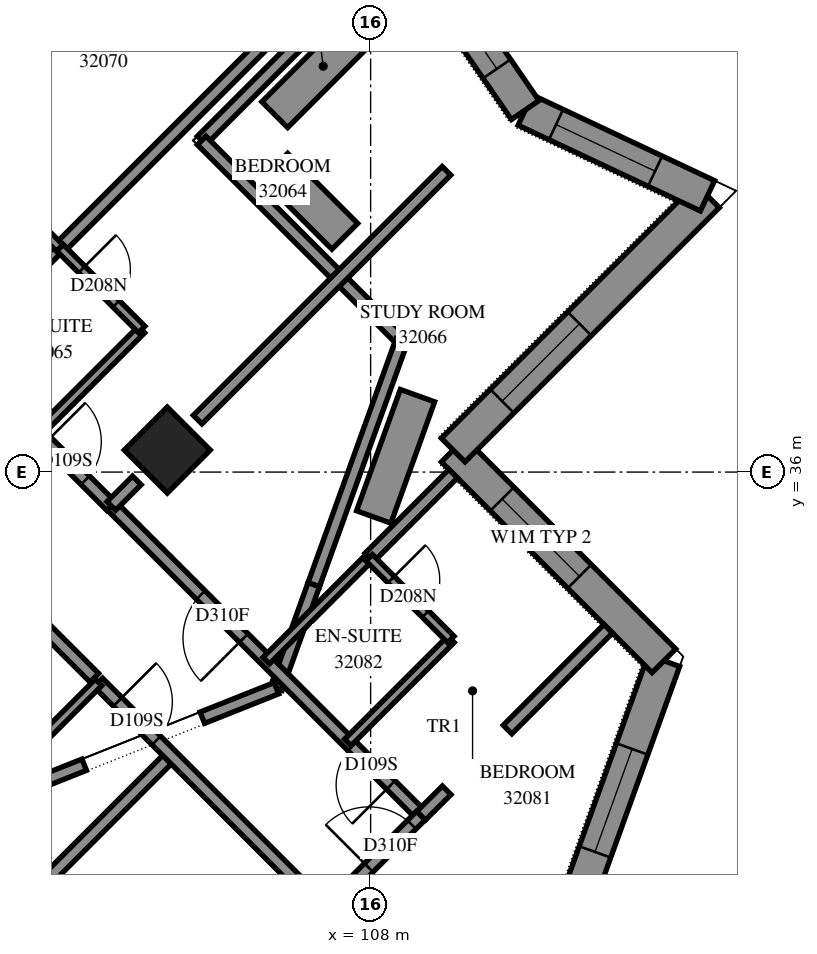
"""IFC4 building model, lengths in metres.
Left out: names, types, materials, properties, quantities, classifications, styles, units other than length and angle.
Written with IfcOpenShell. Run it as: python <this file> out.ifc"""

import sys

from ifc_helpers import new_model, si_unit, direction, frame, frame_2d, origin, origin_2d, place, context, subcontext, project, spatial, polyline, rectangle, outline, extrude, element, fill, save


model = new_model("IFC4")
c1 = context("Model", 3, precision=1e-05, world=origin(), true_north=direction((0.0, 1.0)))
c2 = subcontext(c1, "Body", "Model", "MODEL_VIEW")
j1 = project(units=[si_unit("LENGTHUNIT", "METRE"), si_unit("PLANEANGLEUNIT", "RADIAN")], contexts=[c1])
p1 = place(None, origin())
s1 = spatial("IfcSite", under=j1, at=p1, CompositionType="ELEMENT")
p2 = place(p1, origin())
s2 = spatial("IfcBuilding", under=s1, at=p2, CompositionType="ELEMENT")
p3 = place(p2, frame((0.0, 0.0, 118.6)))
s3 = spatial("IfcBuildingStorey", under=s2, at=p3, CompositionType="ELEMENT", Elevation=118.6)
p4 = place(p3, frame((104.656, 36.362, 0.0), z_axis=(0.0, 0.0, 1.0), x_axis=(0.7071067812, -0.7071067812, 0.0)))
e1 = element("IfcColumn", 1, at=p4, inside=s3, PredefinedType="COLUMN", context=c2, shape_type="SweptSolid", body=[
    extrude(rectangle(XDim=1.0, YDim=1.0, at=origin_2d()), origin(), (0.0, 0.0, 1.0), 3.1),
])
p5 = place(p3, frame((111.01, 27.869, 0.0), z_axis=(0.0, 0.0, 1.0), x_axis=(0.339264672, 0.9406909601, 0.0)))
e2 = element("IfcWall", 2, at=p5, inside=s3, PredefinedType="SOLIDWALL", context=c2, shape_type="SweptSolid", body=[
    extrude(outline(polyline([(-0.124, -0.275), (5.519, -0.275), (5.17, 0.275), (0.124, 0.275), (-0.124, -0.275)])), origin(), (0.0, 0.0, 1.0), 3.1),
])
p6 = place(p5, frame((2.003, 0.0, 0.7)))
e3 = element("IfcOpeningElement", 3, at=p6, cuts=e2, PredefinedType="OPENING", context=c2, shape_type="SweptSolid", body=[
    extrude(rectangle(XDim=1.8, YDim=2.0, at=frame_2d((0.9, 1.0))), frame((0.0, 0.285, 0.0), z_axis=(0.0, -1.0, 0.0), x_axis=(1.0, 0.0, 0.0)), (0.0, 0.0, 1.0), 0.57),
])
p7 = place(p3, frame((112.823, 32.897, 0.0), z_axis=(0.0, 0.0, 1.0), x_axis=(-0.7071067812, 0.7071067812, 0.0)))
e4 = element("IfcWall", 4, at=p7, inside=s3, PredefinedType="SOLIDWALL", context=c2, shape_type="SweptSolid", body=[
    extrude(outline(polyline([(-0.175, -0.275), (4.625, -0.275), (5.175, 0.275), (0.175, 0.275), (-0.175, -0.275)])), origin(), (0.0, 0.0, 1.0), 3.1),
])
p8 = place(p7, frame((1.963, 0.0, 0.7)))
e5 = element("IfcOpeningElement", 5, at=p8, cuts=e4, PredefinedType="OPENING", context=c2, shape_type="SweptSolid", body=[
    extrude(rectangle(XDim=1.8, YDim=1.8, at=frame_2d((0.9, 0.9))), frame((0.0, 0.285, 0.0), z_axis=(0.0, -1.0, 0.0), x_axis=(1.0, 0.0, 0.0)), (0.0, 0.0, 1.0), 0.57),
])
p9 = place(p3, frame((109.358, 36.362, 0.0), z_axis=(0.0, 0.0, 1.0), x_axis=(0.7071067812, 0.7071067812, 0.0)))
e6 = element("IfcWall", 6, at=p9, inside=s3, PredefinedType="SOLIDWALL", context=c2, shape_type="SweptSolid", body=[
    extrude(outline(polyline([(0.275, -0.275), (6.305, -0.275), (5.522, 0.275), (-0.275, 0.275), (0.275, -0.275)])), origin(), (0.0, 0.0, 1.0), 3.1),
])
p10 = place(p9, frame((1.137, 0.0, 0.7)))
e7 = element("IfcOpeningElement", 7, at=p10, cuts=e6, PredefinedType="OPENING", context=c2, shape_type="SweptSolid", body=[
    extrude(rectangle(XDim=1.8, YDim=1.8, at=frame_2d((0.9, 0.9))), frame((0.0, 0.285, 0.0), z_axis=(0.0, -1.0, 0.0), x_axis=(1.0, 0.0, 0.0)), (0.0, 0.0, 1.0), 0.57),
])
p11 = place(p3, frame((113.54, 40.543, 0.0), z_axis=(0.0, 0.0, 1.0), x_axis=(-0.9048864169, 0.4256531129, 0.0)))
e8 = element("IfcWall", 8, at=p11, inside=s3, PredefinedType="SOLIDWALL", context=c2, shape_type="SweptSolid", body=[
    extrude(outline(polyline([(-0.391, -0.275), (3.239, -0.275), (3.387, 0.275), (0.391, 0.275), (-0.391, -0.275)])), origin(), (0.0, 0.0, 1.0), 3.1),
])
p12 = place(p11, frame((0.952, 0.0, 0.7)))
e9 = element("IfcOpeningElement", 9, at=p12, cuts=e8, PredefinedType="OPENING", context=c2, shape_type="SweptSolid", body=[
    extrude(rectangle(XDim=1.8, YDim=2.0, at=frame_2d((0.9, 1.0))), frame((0.0, 0.285, 0.0), z_axis=(0.0, -1.0, 0.0), x_axis=(1.0, 0.0, 0.0)), (0.0, 0.0, 1.0), 0.57),
])
p13 = place(p3, frame((110.542, 41.953, 0.0), z_axis=(0.0, 0.0, 1.0), x_axis=(-0.5670991884, 0.8236495071, 0.0)))
e10 = element("IfcWall", 10, at=p13, inside=s3, PredefinedType="SOLIDWALL", context=c2, shape_type="SweptSolid", body=[
    extrude(outline(polyline([(0.074, -0.275), (3.547, -0.275), (3.446, 0.275), (-0.074, 0.275), (0.074, -0.275)])), origin(), (0.0, 0.0, 1.0), 3.1),
])
p14 = place(p13, frame((0.823, 0.0, 0.7)))
e11 = element("IfcOpeningElement", 11, at=p14, cuts=e10, PredefinedType="OPENING", context=c2, shape_type="SweptSolid", body=[
    extrude(rectangle(XDim=1.8, YDim=2.0, at=frame_2d((0.9, 1.0))), frame((0.0, 0.285, 0.0), z_axis=(0.0, -1.0, 0.0), x_axis=(1.0, 0.0, 0.0)), (0.0, 0.0, 1.0), 0.57),
])
p15 = place(p3, frame((108.379, 44.61, 0.0), z_axis=(0.0, 0.0, 1.0), x_axis=(-0.7071179789, -0.7070955833, 0.0)))
e12 = element("IfcWall", 12, at=p15, inside=s3, PredefinedType="PARAPET", context=c2, shape_type="SweptSolid", body=[
    extrude(outline(polyline([(0.0, -0.1), (4.565, -0.1), (4.365, 0.1), (0.0, 0.1), (0.0, -0.1)])), origin(), (0.0, 0.0, 1.0), 0.25),
])
p16 = place(p3, frame((105.222, 41.453, 0.0), z_axis=(0.0, 0.0, 1.0), x_axis=(0.7071067812, -0.7071067812, 0.0)))
e13 = element("IfcWall", 13, at=p16, inside=s3, PredefinedType="PARAPET", context=c2, shape_type="SweptSolid", body=[
    extrude(outline(polyline([(-0.1, -0.1), (4.59, -0.1), (4.718, 0.1), (0.1, 0.1), (-0.1, -0.1)])), origin(), (0.0, 0.0, 1.0), 0.25),
])
p17 = place(p3, frame((108.512, 38.162, 0.0), z_axis=(0.0, 0.0, 1.0), x_axis=(-0.3392396531, -0.9406999829, 0.0)))
e14 = element("IfcWall", 14, at=p17, inside=s3, PredefinedType="PARAPET", context=c2, shape_type="SweptSolid", body=[
    extrude(outline(polyline([(0.064, -0.1), (4.268, -0.1), (4.268, 0.1), (-0.064, 0.1), (0.064, -0.1)])), origin(), (0.0, 0.0, 1.0), 0.25),
])
p18 = place(p3, frame((107.065, 34.147, 0.0), z_axis=(0.0, 0.0, 1.0), x_axis=(-0.3392614778, -0.940692112, 0.0)))
e15 = element("IfcWall", 15, at=p18, inside=s3, PredefinedType="PARAPET", context=c2, shape_type="SweptSolid", body=[
    extrude(outline(polyline([(0.0, -0.1), (1.764, -0.1), (1.855, 0.1), (0.0, 0.1), (0.0, -0.1)])), origin(), (0.0, 0.0, 1.0), 0.25),
])
p19 = place(p3, frame((106.424, 41.029, 0.0), z_axis=(0.0, 0.0, 1.0), x_axis=(0.7071374776, -0.7070760835, 0.0)))
e16 = element("IfcWall", 16, at=p19, inside=s3, PredefinedType="SOLIDWALL", context=c2, shape_type="SweptSolid", body=[
    extrude(rectangle(XDim=1.629, YDim=0.6, at=frame_2d((0.814, 0.0))), origin(), (0.0, 0.0, 1.0), 0.65),
])
p20 = place(p3, frame((96.465, 23.082, 0.0), z_axis=(0.0, 0.0, 1.0), x_axis=(0.707016895, 0.7071966559, 0.0)))
e17 = element("IfcWall", 17, at=p20, inside=s3, PredefinedType="PARTITIONING", context=c2, shape_type="SweptSolid", body=[
    extrude(rectangle(XDim=11.682, YDim=0.2, at=frame_2d((5.841, 0.0))), origin(), (0.0, 0.0, 1.0), 3.1),
])
p21 = place(p3, frame((102.887, 39.687, 0.0), z_axis=(0.0, 0.0, 1.0), x_axis=(0.707250564, 0.7069629691, 0.0)))
e18 = element("IfcWall", 18, at=p21, inside=s3, PredefinedType="PARTITIONING", context=c2, shape_type="SweptSolid", body=[
    extrude(rectangle(XDim=7.302, YDim=0.2, at=frame_2d((3.651, 0.0))), origin(), (0.0, 0.0, 1.0), 3.1),
])
p22 = place(p3, frame((108.831, 30.355, 0.0), z_axis=(0.0, 0.0, 1.0), x_axis=(-0.7073012053, 0.7069123036, 0.0)))
e19 = element("IfcWall", 19, at=p22, inside=s3, PredefinedType="PARTITIONING", context=c2, shape_type="SweptSolid", body=[
    extrude(rectangle(XDim=7.2, YDim=0.2, at=frame_2d((3.6, 0.0))), origin(), (0.0, 0.0, 1.0), 3.1),
])
p23 = place(p22, frame((4.125, 0.0, 0.0)))
e20 = element("IfcOpeningElement", 20, at=p23, cuts=e19, PredefinedType="OPENING", context=c2, shape_type="SweptSolid", body=[
    extrude(rectangle(XDim=1.0, YDim=2.1, at=frame_2d((0.5, 1.05))), frame((0.0, 0.11, 0.0), z_axis=(0.0, -1.0, 0.0), x_axis=(1.0, 0.0, 0.0)), (0.0, 0.0, 1.0), 0.22),
])
p24 = place(p22, frame((0.705, 0.0, 0.0)))
e21 = element("IfcOpeningElement", 21, at=p24, cuts=e19, PredefinedType="OPENING", context=c2, shape_type="SweptSolid", body=[
    extrude(rectangle(XDim=0.9, YDim=2.1, at=frame_2d((0.45, 1.05))), frame((0.0, 0.11, 0.0), z_axis=(0.0, -1.0, 0.0), x_axis=(1.0, 0.0, 0.0)), (0.0, 0.0, 1.0), 0.22),
])
for number, where, z_axis, x_axis in (
    (22, (105.155, 36.863, 0.0), (0.0, 0.0, 1.0), (0.707, 0.707, 0.0)),
    (23, (100.063, 41.953, 0.0), (0.0, 0.0, 1.0), (0.707, 0.707, 0.0)),
):
    element("IfcWall", number, at=place(p3, frame(where, z_axis=z_axis, x_axis=x_axis)), inside=s3, PredefinedType="PARTITIONING", context=c2, shape_type="SweptSolid", body=[
        extrude(rectangle(XDim=5.787, YDim=0.2, at=frame_2d((2.893, 0.0))), origin(), (0.0, 0.0, 1.0), 3.1),
    ])
p25 = place(p3, frame((103.521, 32.541, 0.0), z_axis=(0.0, 0.0, 1.0), x_axis=(0.7071067812, -0.7071067812, 0.0)))
e24 = element("IfcWall", 24, at=p25, inside=s3, PredefinedType="PARTITIONING", context=c2, shape_type="SweptSolid", body=[
    extrude(rectangle(XDim=5.301, YDim=0.2, at=frame_2d((2.65, 0.0))), origin(), (0.0, 0.0, 1.0), 3.1),
])
p26 = place(p25, frame((0.451, 0.0, 0.0)))
e25 = element("IfcOpeningElement", 25, at=p26, cuts=e24, PredefinedType="OPENING", context=c2, shape_type="SweptSolid", body=[
    extrude(rectangle(XDim=0.9, YDim=2.1, at=frame_2d((0.45, 1.05))), frame((0.0, 0.11, 0.0), z_axis=(0.0, -1.0, 0.0), x_axis=(1.0, 0.0, 0.0)), (0.0, 0.0, 1.0), 0.22),
])
p27 = place(p3, frame((102.533, 36.645, 0.0), z_axis=(0.0, 0.0, 1.0), x_axis=(0.7071067812, 0.7071067812, 0.0)))
e26 = element("IfcWall", 26, at=p27, inside=s3, PredefinedType="PARTITIONING", context=c2, shape_type="SweptSolid", body=[
    extrude(rectangle(XDim=2.401, YDim=0.15, at=frame_2d((1.201, 0.0))), origin(), (0.0, 0.0, 1.0), 3.1),
])
for number, where, z_axis, x_axis in (
    (27, (101.192, 37.988, 0.0), (0.0, 0.0, 1.0), (0.707, 0.708, 0.0)),
    (28, (101.83, 30.844, 0.0), (0.0, 0.0, 1.0), (0.707, 0.708, 0.0)),
):
    element("IfcWall", number, at=place(p3, frame(where, z_axis=z_axis, x_axis=x_axis)), inside=s3, PredefinedType="PARTITIONING", context=c2, shape_type="SweptSolid", body=[
        extrude(rectangle(XDim=2.4, YDim=0.15, at=frame_2d((1.2, 0.0))), origin(), (0.0, 0.0, 1.0), 3.1),
    ])
for number, where, z_axis, x_axis in (
    (29, (106.283, 32.899, 0.0), (0.0, 0.0, 1.0), (0.707, 0.707, 0.0)),
    (30, (107.625, 31.555, 0.0), (0.0, 0.0, 1.0), (0.707, 0.707, 0.0)),
):
    element("IfcWall", number, at=place(p3, frame(where, z_axis=z_axis, x_axis=x_axis)), inside=s3, PredefinedType="PARTITIONING", context=c2, shape_type="SweptSolid", body=[
        extrude(rectangle(XDim=2.398, YDim=0.15, at=frame_2d((1.199, 0.0))), origin(), (0.0, 0.0, 1.0), 3.1),
    ])
p28 = place(p3, frame((110.251, 31.767, 0.0), z_axis=(0.0, 0.0, 1.0), x_axis=(0.7066584143, 0.7075548639, 0.0)))
e31 = element("IfcWall", 31, at=p28, inside=s3, PredefinedType="PARTITIONING", context=c2, shape_type="SweptSolid", body=[
    extrude(rectangle(XDim=2.343, YDim=0.2, at=frame_2d((1.171, 0.0))), origin(), (0.0, 0.0, 1.0), 3.1),
])
p29 = place(p3, frame((107.271, 28.797, 0.0), z_axis=(0.0, 0.0, 1.0), x_axis=(0.7071067812, 0.7071067812, 0.0)))
e32 = element("IfcWall", 32, at=p29, inside=s3, PredefinedType="PARTITIONING", context=c2, shape_type="SweptSolid", body=[
    extrude(rectangle(XDim=2.2, YDim=0.2, at=frame_2d((1.1, 0.0))), origin(), (0.0, 0.0, 1.0), 3.1),
])
p30 = place(p29, frame((0.987, 0.0, 0.0)))
e33 = element("IfcOpeningElement", 33, at=p30, cuts=e32, PredefinedType="OPENING", context=c2, shape_type="SweptSolid", body=[
    extrude(rectangle(XDim=1.0, YDim=2.1, at=frame_2d((0.5, 1.05))), frame((0.0, 0.11, 0.0), z_axis=(0.0, -1.0, 0.0), x_axis=(1.0, 0.0, 0.0)), (0.0, 0.0, 1.0), 0.22),
])
p31 = place(p3, frame((102.891, 39.69, 0.0), z_axis=(0.0, 0.0, 1.0), x_axis=(0.7071067812, -0.7071067812, 0.0)))
e34 = element("IfcWall", 34, at=p31, inside=s3, PredefinedType="PARTITIONING", context=c2, shape_type="SweptSolid", body=[
    extrude(rectangle(XDim=1.901, YDim=0.15, at=frame_2d((0.95, 0.0))), origin(), (0.0, 0.0, 1.0), 3.1),
])
p32 = place(p31, frame((0.505, 0.0, 0.0)))
e35 = element("IfcOpeningElement", 35, at=p32, cuts=e34, PredefinedType="OPENING", context=c2, shape_type="SweptSolid", body=[
    extrude(rectangle(XDim=0.8, YDim=2.1, at=frame_2d((0.4, 1.05))), frame((0.0, 0.085, 0.0), z_axis=(0.0, -1.0, 0.0), x_axis=(1.0, 0.0, 0.0)), (0.0, 0.0, 1.0), 0.17),
])
p33 = place(p3, frame((107.979, 34.595, 0.0), z_axis=(0.0, 0.0, 1.0), x_axis=(0.7071067812, 0.7071067812, 0.0)))
e36 = element("IfcWall", 36, at=p33, inside=s3, PredefinedType="PARTITIONING", context=c2, shape_type="SweptSolid", body=[
    extrude(rectangle(XDim=1.95, YDim=0.2, at=frame_2d((0.975, 0.0))), origin(), (0.0, 0.0, 1.0), 3.1),
])
p34 = place(p3, frame((107.977, 34.591, 0.0), z_axis=(0.0, 0.0, 1.0), x_axis=(0.7065800724, -0.7076330979, 0.0)))
e37 = element("IfcWall", 37, at=p34, inside=s3, PredefinedType="PARTITIONING", context=c2, shape_type="SweptSolid", body=[
    extrude(rectangle(XDim=1.899, YDim=0.15, at=frame_2d((0.95, 0.0))), origin(), (0.0, 0.0, 1.0), 3.1),
])
p35 = place(p34, frame((0.508, 0.0, 0.0)))
e38 = element("IfcOpeningElement", 38, at=p35, cuts=e37, PredefinedType="OPENING", context=c2, shape_type="SweptSolid", body=[
    extrude(rectangle(XDim=0.8, YDim=2.1, at=frame_2d((0.4, 1.05))), frame((0.0, 0.085, 0.0), z_axis=(0.0, -1.0, 0.0), x_axis=(1.0, 0.0, 0.0)), (0.0, 0.0, 1.0), 0.17),
])
p36 = place(p3, frame((101.543, 41.027, 0.0), z_axis=(0.0, 0.0, 1.0), x_axis=(0.7076330979, -0.7065800724, 0.0)))
e39 = element("IfcWall", 39, at=p36, inside=s3, PredefinedType="PARTITIONING", context=c2, shape_type="SweptSolid", body=[
    extrude(rectangle(XDim=1.899, YDim=0.15, at=frame_2d((0.95, 0.0))), origin(), (0.0, 0.0, 1.0), 3.1),
])
p37 = place(p36, frame((0.493, 0.0, 0.0)))
e40 = element("IfcOpeningElement", 40, at=p37, cuts=e39, PredefinedType="OPENING", context=c2, shape_type="SweptSolid", body=[
    extrude(rectangle(XDim=0.8, YDim=2.1, at=frame_2d((0.4, 1.05))), frame((0.0, 0.085, 0.0), z_axis=(0.0, -1.0, 0.0), x_axis=(1.0, 0.0, 0.0)), (0.0, 0.0, 1.0), 0.17),
])
p38 = place(p3, frame((102.183, 33.889, 0.0), z_axis=(0.0, 0.0, 1.0), x_axis=(0.7076620277, -0.7065510983, 0.0)))
e41 = element("IfcWall", 41, at=p38, inside=s3, PredefinedType="PARTITIONING", context=c2, shape_type="SweptSolid", body=[
    extrude(rectangle(XDim=1.8, YDim=0.2, at=frame_2d((0.9, 0.0))), origin(), (0.0, 0.0, 1.0), 3.1),
])
p39 = place(p3, frame((102.531, 36.641, 0.0), z_axis=(0.0, 0.0, 1.0), x_axis=(0.7071067812, -0.7071067812, 0.0)))
e42 = element("IfcWall", 42, at=p39, inside=s3, PredefinedType="PARTITIONING", context=c2, shape_type="SweptSolid", body=[
    extrude(rectangle(XDim=1.7, YDim=0.2, at=frame_2d((0.85, 0.0))), origin(), (0.0, 0.0, 1.0), 3.1),
])
p40 = place(p39, frame((0.198, 0.0, 0.0)))
e43 = element("IfcOpeningElement", 43, at=p40, cuts=e42, PredefinedType="OPENING", context=c2, shape_type="SweptSolid", body=[
    extrude(rectangle(XDim=0.9, YDim=2.1, at=frame_2d((0.45, 1.05))), frame((0.0, 0.11, 0.0), z_axis=(0.0, -1.0, 0.0), x_axis=(1.0, 0.0, 0.0)), (0.0, 0.0, 1.0), 0.22),
])
p41 = place(p3, frame((103.735, 35.443, 0.0), z_axis=(0.0, 0.0, 1.0), x_axis=(0.7071067812, 0.7071067812, 0.0)))
e44 = element("IfcWall", 44, at=p41, inside=s3, PredefinedType="PARTITIONING", context=c2, shape_type="SweptSolid", body=[
    extrude(rectangle(XDim=0.594, YDim=0.2, at=frame_2d((0.297, 0.0))), origin(), (0.0, 0.0, 1.0), 2.6),
])
p42 = place(p3, frame((108.831, 30.349, 0.0), z_axis=(0.0, 0.0, 1.0), x_axis=(0.7087923682, 0.7054171665, 0.0)))
e45 = element("IfcWall", 45, at=p42, inside=s3, PredefinedType="PARTITIONING", context=c2, shape_type="SweptSolid", body=[
    extrude(rectangle(XDim=0.593, YDim=0.2, at=frame_2d((0.296, 0.0))), origin(), (0.0, 0.0, 1.0), 3.1),
])
p43 = place(p3, frame((106.451, 32.445, 0.0), z_axis=(0.0, 0.0, 1.0), x_axis=(-0.9291537049, -0.369693647, 0.0)))
e46 = element("IfcWall", 46, at=p43, inside=s3, PredefinedType="PARAPET", context=c2, shape_type="SweptSolid", body=[
    extrude(outline(polyline([(0.045, -0.1), (1.311, -0.1), (1.311, 0.1), (-0.045, 0.1), (0.045, -0.1)])), origin(), (0.0, 0.0, 1.0), 0.25),
])
p44 = place(p3, frame((103.29, 31.188, 0.0), z_axis=(0.0, 0.0, 1.0), x_axis=(-0.9291561184, -0.3696875811, 0.0)))
e47 = element("IfcWall", 47, at=p44, inside=s3, PredefinedType="PARAPET", context=c2, shape_type="SweptSolid", body=[
    extrude(outline(polyline([(0.0, -0.1), (2.21, -0.1), (2.124, 0.1), (0.0, 0.1), (0.0, -0.1)])), origin(), (0.0, 0.0, 1.0), 0.25),
])
p45 = place(p3, frame((108.017, 43.47, 0.0), z_axis=(0.0, 0.0, 1.0), x_axis=(-0.7071289757, -0.707084586, 0.0)))
e48 = element("IfcWall", 48, at=p45, inside=s3, PredefinedType="SOLIDWALL", context=c2, shape_type="SweptSolid", body=[
    extrude(outline(polyline([(0.0, -0.3), (2.253, -0.3), (2.253, 0.3), (0.0, 0.3), (0.0, -0.3)])), origin(), (0.0, 0.0, 1.0), 0.65),
])
p46 = place(p3, frame((108.771, 37.257, 0.0), z_axis=(0.0, 0.0, 1.0), x_axis=(-0.3392436018, -0.9406985589, 0.0)))
e49 = element("IfcWall", 49, at=p46, inside=s3, PredefinedType="SOLIDWALL", context=c2, shape_type="SweptSolid", body=[
    extrude(outline(polyline([(0.0, -0.3), (2.121, -0.3), (2.121, 0.3), (0.0, 0.3), (0.0, -0.3)])), origin(), (0.0, 0.0, 1.0), 0.65),
])
p47 = place(p6, origin())
e50 = element("IfcWindow", 50, at=p47, inside=s3, PartitioningType="SINGLE_PANEL", PredefinedType="WINDOW", context=c2, shape_type="SweptSolid", body=[
    extrude(rectangle(XDim=1.8, YDim=2.0, at=frame_2d((0.9, 1.0))), frame((0.0, 0.155, 0.0), z_axis=(0.0, -1.0, 0.0), x_axis=(1.0, 0.0, 0.0)), (0.0, 0.0, 1.0), 0.06),
])
fill(e3, e50)
p48 = place(p8, origin())
e51 = element("IfcWindow", 51, at=p48, inside=s3, PartitioningType="SINGLE_PANEL", PredefinedType="WINDOW", context=c2, shape_type="SweptSolid", body=[
    extrude(rectangle(XDim=1.8, YDim=1.8, at=frame_2d((0.9, 0.9))), frame((0.0, 0.155, 0.0), z_axis=(0.0, -1.0, 0.0), x_axis=(1.0, 0.0, 0.0)), (0.0, 0.0, 1.0), 0.06),
])
fill(e5, e51)
p49 = place(p10, origin())
e52 = element("IfcWindow", 52, at=p49, inside=s3, PartitioningType="SINGLE_PANEL", PredefinedType="WINDOW", context=c2, shape_type="SweptSolid", body=[
    extrude(rectangle(XDim=1.8, YDim=1.8, at=frame_2d((0.9, 0.9))), frame((0.0, 0.155, 0.0), z_axis=(0.0, -1.0, 0.0), x_axis=(1.0, 0.0, 0.0)), (0.0, 0.0, 1.0), 0.06),
])
fill(e7, e52)
p50 = place(p12, origin())
e53 = element("IfcWindow", 53, at=p50, inside=s3, PartitioningType="SINGLE_PANEL", PredefinedType="WINDOW", context=c2, shape_type="SweptSolid", body=[
    extrude(rectangle(XDim=1.8, YDim=2.0, at=frame_2d((0.9, 1.0))), frame((0.0, 0.155, 0.0), z_axis=(0.0, -1.0, 0.0), x_axis=(1.0, 0.0, 0.0)), (0.0, 0.0, 1.0), 0.06),
])
fill(e9, e53)
p51 = place(p14, origin())
e54 = element("IfcWindow", 54, at=p51, inside=s3, PartitioningType="SINGLE_PANEL", PredefinedType="WINDOW", context=c2, shape_type="SweptSolid", body=[
    extrude(rectangle(XDim=1.8, YDim=2.0, at=frame_2d((0.9, 1.0))), frame((0.0, 0.155, 0.0), z_axis=(0.0, -1.0, 0.0), x_axis=(1.0, 0.0, 0.0)), (0.0, 0.0, 1.0), 0.06),
])
fill(e11, e54)
p52 = place(p40, origin())
e55 = element("IfcDoor", 55, at=p52, inside=s3, OperationType="SINGLE_SWING_RIGHT", PredefinedType="DOOR", context=c2, shape_type="SweptSolid", body=[
    extrude(rectangle(XDim=0.9, YDim=2.1, at=frame_2d((0.45, 1.05))), frame((0.0, 0.025, 0.0), z_axis=(0.0, -1.0, 0.0), x_axis=(1.0, 0.0, 0.0)), (0.0, 0.0, 1.0), 0.05),
])
fill(e43, e55)
p53 = place(p32, origin())
e56 = element("IfcDoor", 56, at=p53, inside=s3, OperationType="SINGLE_SWING_RIGHT", PredefinedType="DOOR", context=c2, shape_type="SweptSolid", body=[
    extrude(rectangle(XDim=0.8, YDim=2.1, at=frame_2d((0.4, 1.05))), frame((0.0, 0.025, 0.0), z_axis=(0.0, -1.0, 0.0), x_axis=(1.0, 0.0, 0.0)), (0.0, 0.0, 1.0), 0.05),
])
fill(e35, e56)
p54 = place(p23, origin())
e57 = element("IfcDoor", 57, at=p54, inside=s3, OperationType="SINGLE_SWING_LEFT", PredefinedType="DOOR", context=c2, shape_type="SweptSolid", body=[
    extrude(rectangle(XDim=1.0, YDim=2.1, at=frame_2d((0.5, 1.05))), frame((0.0, 0.025, 0.0), z_axis=(0.0, -1.0, 0.0), x_axis=(1.0, 0.0, 0.0)), (0.0, 0.0, 1.0), 0.05),
])
fill(e20, e57)
p55 = place(p26, origin())
e58 = element("IfcDoor", 58, at=p55, inside=s3, OperationType="SINGLE_SWING_RIGHT", PredefinedType="DOOR", context=c2, shape_type="SweptSolid", body=[
    extrude(rectangle(XDim=0.9, YDim=2.1, at=frame_2d((0.45, 1.05))), frame((0.0, 0.025, 0.0), z_axis=(0.0, -1.0, 0.0), x_axis=(1.0, 0.0, 0.0)), (0.0, 0.0, 1.0), 0.05),
])
fill(e25, e58)
p56 = place(p24, origin())
e59 = element("IfcDoor", 59, at=p56, inside=s3, OperationType="SINGLE_SWING_RIGHT", PredefinedType="DOOR", context=c2, shape_type="SweptSolid", body=[
    extrude(rectangle(XDim=0.9, YDim=2.1, at=frame_2d((0.45, 1.05))), frame((0.0, 0.025, 0.0), z_axis=(0.0, -1.0, 0.0), x_axis=(1.0, 0.0, 0.0)), (0.0, 0.0, 1.0), 0.05),
])
fill(e21, e59)
p57 = place(p35, origin())
e60 = element("IfcDoor", 60, at=p57, inside=s3, OperationType="SINGLE_SWING_RIGHT", PredefinedType="DOOR", context=c2, shape_type="SweptSolid", body=[
    extrude(rectangle(XDim=0.8, YDim=2.1, at=frame_2d((0.4, 1.05))), frame((0.0, 0.025, 0.0), z_axis=(0.0, -1.0, 0.0), x_axis=(1.0, 0.0, 0.0)), (0.0, 0.0, 1.0), 0.05),
])
fill(e38, e60)
p58 = place(p30, origin())
e61 = element("IfcDoor", 61, at=p58, inside=s3, OperationType="SINGLE_SWING_RIGHT", PredefinedType="DOOR", context=c2, shape_type="SweptSolid", body=[
    extrude(rectangle(XDim=1.0, YDim=2.1, at=frame_2d((0.5, 1.05))), frame((0.0, 0.025, 0.0), z_axis=(0.0, -1.0, 0.0), x_axis=(1.0, 0.0, 0.0)), (0.0, 0.0, 1.0), 0.05),
])
fill(e33, e61)
save(model, sys.argv[1])
